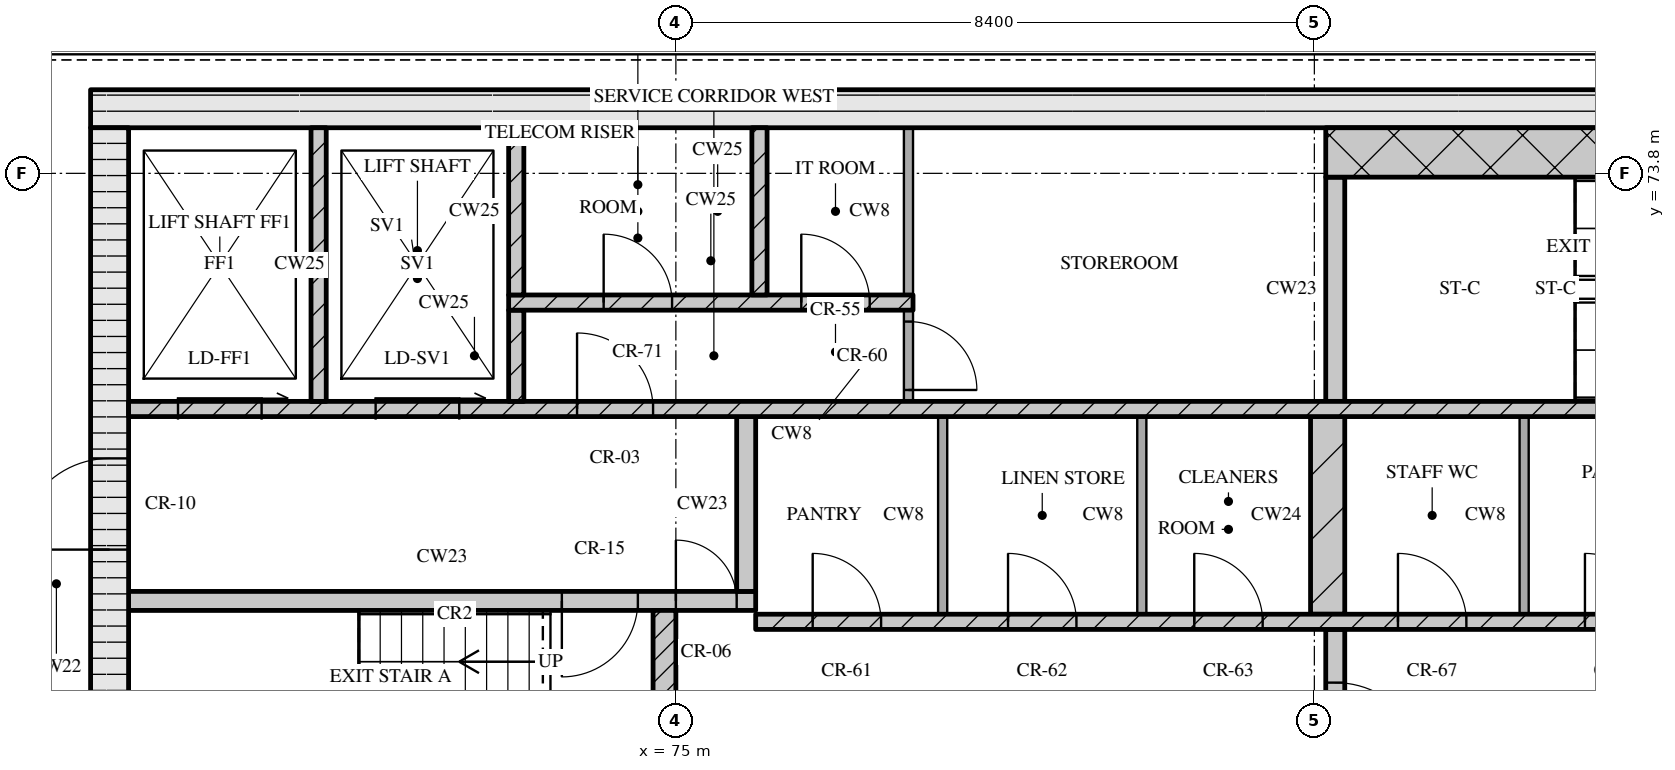
"""IFC4 building model, lengths in metres.
Left out: names, types, materials, properties, quantities, classifications, styles, units other than length and angle.
Written with IfcOpenShell. Run it as: python <this file> out.ifc"""

import sys

from ifc_helpers import new_model, si_unit, direction, frame, frame_2d, origin, place, context, subcontext, project, spatial, rectangle, extrude, element, fill, save


model = new_model("IFC4")
c1 = context("Model", 3, precision=1e-05, world=origin(), true_north=direction((0.0, 1.0)))
c2 = subcontext(c1, "Body", "Model", "MODEL_VIEW")
j1 = project(units=[si_unit("LENGTHUNIT", "METRE"), si_unit("PLANEANGLEUNIT", "RADIAN")], contexts=[c1])
p1 = place(None, origin())
s1 = spatial("IfcSite", under=j1, at=p1, CompositionType="ELEMENT")
p2 = place(p1, origin())
s2 = spatial("IfcBuilding", under=s1, at=p2, CompositionType="ELEMENT")
p3 = place(p2, frame((0.0, 0.0, 285.15)))
s3 = spatial("IfcBuildingStorey", under=s2, at=p3, CompositionType="ELEMENT", Elevation=285.15)
p4 = place(p3, frame((67.3, 74.65, 0.0), z_axis=(0.0, 0.0, 1.0), x_axis=(1.0, 0.0, 0.0)))
e1 = element("IfcWall", 1, at=p4, inside=s3, PredefinedType="SOLIDWALL", context=c2, shape_type="SweptSolid", body=[
    extrude(rectangle(XDim=40.6, YDim=0.5, at=frame_2d((20.3, 0.0))), origin(), (0.0, 0.0, 1.0), 3.32),
])
p5 = place(p3, frame((67.55, 62.4, 0.0), z_axis=(0.0, 0.0, 1.0), x_axis=(0.0, 1.0, 0.0)))
e2 = element("IfcWall", 2, at=p5, inside=s3, PredefinedType="SOLIDWALL", context=c2, shape_type="SweptSolid", body=[
    extrude(rectangle(XDim=12.0, YDim=0.5, at=frame_2d((6.0, 0.0))), origin(), (0.0, 0.0, 1.0), 3.32),
])
p6 = place(p5, frame((6.45, 0.0, 0.0)))
e3 = element("IfcOpeningElement", 3, at=p6, cuts=e2, PredefinedType="OPENING", context=c2, shape_type="SweptSolid", body=[
    extrude(rectangle(XDim=1.2, YDim=2.1, at=frame_2d((0.6, 1.05))), frame((0.0, 0.26, 0.0), z_axis=(0.0, -1.0, 0.0), x_axis=(1.0, 0.0, 0.0)), (0.0, 0.0, 1.0), 0.52),
])
p7 = place(p3, frame((74.85, 65.2, 0.0), z_axis=(0.0, 0.0, 1.0), x_axis=(0.0, 1.0, 0.0)))
e4 = element("IfcWall", 4, at=p7, inside=s3, PredefinedType="SOLIDWALL", context=c2, shape_type="SweptSolid", body=[
    extrude(rectangle(XDim=2.85, YDim=0.3, at=frame_2d((1.425, 0.0))), origin(), (0.0, 0.0, 1.0), 3.32),
])
p8 = place(p3, frame((83.675, 65.2, 0.0), z_axis=(0.0, 0.0, 1.0), x_axis=(0.0, 1.0, 0.0)))
e5 = element("IfcWall", 5, at=p8, inside=s3, PredefinedType="SOLIDWALL", context=c2, shape_type="SweptSolid", body=[
    extrude(rectangle(XDim=2.6, YDim=0.25, at=frame_2d((1.3, 0.0))), origin(), (0.0, 0.0, 1.0), 3.32),
])
p9 = place(p8, frame((0.7, 0.0, 0.0)))
e6 = element("IfcOpeningElement", 6, at=p9, cuts=e5, PredefinedType="OPENING", context=c2, shape_type="SweptSolid", body=[
    extrude(rectangle(XDim=1.2, YDim=2.1, at=frame_2d((0.6, 1.05))), frame((0.0, 0.135, 0.0), z_axis=(0.0, -1.0, 0.0), x_axis=(1.0, 0.0, 0.0)), (0.0, 0.0, 1.0), 0.27),
])
p10 = place(p3, frame((76.05, 67.9, 0.0), z_axis=(0.0, 0.0, 1.0), x_axis=(1.0, 0.0, 0.0)))
e7 = element("IfcWall", 7, at=p10, inside=s3, PredefinedType="SOLIDWALL", context=c2, shape_type="SweptSolid", body=[
    extrude(rectangle(XDim=23.1, YDim=0.2, at=frame_2d((11.55, 0.0))), origin(), (0.0, 0.0, 1.0), 3.32),
])
p11 = place(p10, frame((0.75, 0.0, 0.0)))
e8 = element("IfcOpeningElement", 8, at=p11, cuts=e7, PredefinedType="OPENING", context=c2, shape_type="SweptSolid", body=[
    extrude(rectangle(XDim=0.9, YDim=2.1, at=frame_2d((0.45, 1.05))), frame((0.0, 0.11, 0.0), z_axis=(0.0, -1.0, 0.0), x_axis=(1.0, 0.0, 0.0)), (0.0, 0.0, 1.0), 0.22),
])
p12 = place(p10, frame((3.32, 0.0, 0.0)))
e9 = element("IfcOpeningElement", 9, at=p12, cuts=e7, PredefinedType="OPENING", context=c2, shape_type="SweptSolid", body=[
    extrude(rectangle(XDim=0.9, YDim=2.1, at=frame_2d((0.45, 1.05))), frame((0.0, 0.11, 0.0), z_axis=(0.0, -1.0, 0.0), x_axis=(1.0, 0.0, 0.0)), (0.0, 0.0, 1.0), 0.22),
])
p13 = place(p10, frame((5.77, 0.0, 0.0)))
e10 = element("IfcOpeningElement", 10, at=p13, cuts=e7, PredefinedType="OPENING", context=c2, shape_type="SweptSolid", body=[
    extrude(rectangle(XDim=0.9, YDim=2.1, at=frame_2d((0.45, 1.05))), frame((0.0, 0.11, 0.0), z_axis=(0.0, -1.0, 0.0), x_axis=(1.0, 0.0, 0.0)), (0.0, 0.0, 1.0), 0.22),
])
p14 = place(p10, frame((8.45, 0.0, 0.0)))
e11 = element("IfcOpeningElement", 11, at=p14, cuts=e7, PredefinedType="OPENING", context=c2, shape_type="SweptSolid", body=[
    extrude(rectangle(XDim=0.9, YDim=2.1, at=frame_2d((0.45, 1.05))), frame((0.0, 0.11, 0.0), z_axis=(0.0, -1.0, 0.0), x_axis=(1.0, 0.0, 0.0)), (0.0, 0.0, 1.0), 0.22),
])
p15 = place(p10, frame((10.91, 0.0, 0.0)))
e12 = element("IfcOpeningElement", 12, at=p15, cuts=e7, PredefinedType="OPENING", context=c2, shape_type="SweptSolid", body=[
    extrude(rectangle(XDim=0.9, YDim=2.1, at=frame_2d((0.45, 1.05))), frame((0.0, 0.11, 0.0), z_axis=(0.0, -1.0, 0.0), x_axis=(1.0, 0.0, 0.0)), (0.0, 0.0, 1.0), 0.22),
])
p16 = place(p10, frame((13.55, 0.0, 0.0)))
e13 = element("IfcOpeningElement", 13, at=p16, cuts=e7, PredefinedType="OPENING", context=c2, shape_type="SweptSolid", body=[
    extrude(rectangle(XDim=1.0, YDim=2.1, at=frame_2d((0.5, 1.05))), frame((0.0, 0.11, 0.0), z_axis=(0.0, -1.0, 0.0), x_axis=(1.0, 0.0, 0.0)), (0.0, 0.0, 1.0), 0.22),
])
p17 = place(p10, frame((16.2, 0.0, 0.0)))
e14 = element("IfcOpeningElement", 14, at=p17, cuts=e7, PredefinedType="OPENING", context=c2, shape_type="SweptSolid", body=[
    extrude(rectangle(XDim=1.1, YDim=2.1, at=frame_2d((0.55, 1.05))), frame((0.0, 0.11, 0.0), z_axis=(0.0, -1.0, 0.0), x_axis=(1.0, 0.0, 0.0)), (0.0, 0.0, 1.0), 0.22),
])
p18 = place(p10, frame((18.7, 0.0, 0.0)))
e15 = element("IfcOpeningElement", 15, at=p18, cuts=e7, PredefinedType="OPENING", context=c2, shape_type="SweptSolid", body=[
    extrude(rectangle(XDim=1.1, YDim=2.1, at=frame_2d((0.55, 1.05))), frame((0.0, 0.11, 0.0), z_axis=(0.0, -1.0, 0.0), x_axis=(1.0, 0.0, 0.0)), (0.0, 0.0, 1.0), 0.22),
])
p19 = place(p10, frame((21.2, 0.0, 0.0)))
e16 = element("IfcOpeningElement", 16, at=p19, cuts=e7, PredefinedType="OPENING", context=c2, shape_type="SweptSolid", body=[
    extrude(rectangle(XDim=1.1, YDim=2.1, at=frame_2d((0.55, 1.05))), frame((0.0, 0.11, 0.0), z_axis=(0.0, -1.0, 0.0), x_axis=(1.0, 0.0, 0.0)), (0.0, 0.0, 1.0), 0.22),
])
for number, where, z_axis, x_axis in (
    (17, (78.51, 68.0, 0.0), (0.0, 0.0, 1.0), (0.0, 1.0, 0.0)),
    (18, (81.13, 68.0, 0.0), (0.0, 0.0, 1.0), (0.0, 1.0, 0.0)),
):
    element("IfcWall", number, at=place(p3, frame(where, z_axis=z_axis, x_axis=x_axis)), inside=s3, PredefinedType="PARTITIONING", context=c2, shape_type="SweptSolid", body=[
        extrude(rectangle(XDim=2.6, YDim=0.12, at=frame_2d((1.3, 0.0))), origin(), (0.0, 0.0, 1.0), 3.32),
    ])
p20 = place(p3, frame((83.575, 68.0, 0.0), z_axis=(0.0, 0.0, 1.0), x_axis=(0.0, 1.0, 0.0)))
e19 = element("IfcWall", 19, at=p20, inside=s3, PredefinedType="SOLIDWALL", context=c2, shape_type="SweptSolid", body=[
    extrude(rectangle(XDim=2.6, YDim=0.45, at=frame_2d((1.3, 0.0))), origin(), (0.0, 0.0, 1.0), 3.32),
])
p21 = place(p3, frame((86.16, 68.0, 0.0), z_axis=(0.0, 0.0, 1.0), x_axis=(0.0, 1.0, 0.0)))
e20 = element("IfcWall", 20, at=p21, inside=s3, PredefinedType="PARTITIONING", context=c2, shape_type="SweptSolid", body=[
    extrude(rectangle(XDim=2.6, YDim=0.12, at=frame_2d((1.3, 0.0))), origin(), (0.0, 0.0, 1.0), 3.32),
])
p22 = place(p3, frame((67.8, 68.175, 0.0), z_axis=(0.0, 0.0, 1.0), x_axis=(1.0, 0.0, 0.0)))
e21 = element("IfcWall", 21, at=p22, inside=s3, PredefinedType="SOLIDWALL", context=c2, shape_type="SweptSolid", body=[
    extrude(rectangle(XDim=8.25, YDim=0.25, at=frame_2d((4.125, 0.0))), origin(), (0.0, 0.0, 1.0), 3.32),
])
p23 = place(p22, frame((5.7, 0.0, 0.0)))
e22 = element("IfcOpeningElement", 22, at=p23, cuts=e21, PredefinedType="OPENING", context=c2, shape_type="SweptSolid", body=[
    extrude(rectangle(XDim=1.0, YDim=2.1, at=frame_2d((0.5, 1.05))), frame((0.0, 0.135, 0.0), z_axis=(0.0, -1.0, 0.0), x_axis=(1.0, 0.0, 0.0)), (0.0, 0.0, 1.0), 0.27),
])
p24 = place(p22, frame((7.2, 0.0, 0.0)))
e23 = element("IfcOpeningElement", 23, at=p24, cuts=e21, PredefinedType="OPENING", context=c2, shape_type="SweptSolid", body=[
    extrude(rectangle(XDim=0.8, YDim=2.1, at=frame_2d((0.4, 1.05))), frame((0.0, 0.135, 0.0), z_axis=(0.0, -1.0, 0.0), x_axis=(1.0, 0.0, 0.0)), (0.0, 0.0, 1.0), 0.27),
])
p25 = place(p3, frame((75.925, 68.3, 0.0), z_axis=(0.0, 0.0, 1.0), x_axis=(0.0, 1.0, 0.0)))
e24 = element("IfcWall", 24, at=p25, inside=s3, PredefinedType="SOLIDWALL", context=c2, shape_type="SweptSolid", body=[
    extrude(rectangle(XDim=2.3, YDim=0.25, at=frame_2d((1.15, 0.0))), origin(), (0.0, 0.0, 1.0), 3.32),
])
p26 = place(p3, frame((67.8, 70.7, 0.0), z_axis=(0.0, 0.0, 1.0), x_axis=(1.0, 0.0, 0.0)))
e25 = element("IfcWall", 25, at=p26, inside=s3, PredefinedType="SOLIDWALL", context=c2, shape_type="SweptSolid", body=[
    extrude(rectangle(XDim=39.6, YDim=0.2, at=frame_2d((19.8, 0.0))), origin(), (0.0, 0.0, 1.0), 3.32),
])
p27 = place(p26, frame((0.65, 0.0, 0.0)))
e26 = element("IfcOpeningElement", 26, at=p27, cuts=e25, PredefinedType="OPENING", context=c2, shape_type="SweptSolid", body=[
    extrude(rectangle(XDim=1.1, YDim=2.1, at=frame_2d((0.55, 1.05))), frame((0.0, 0.11, 0.0), z_axis=(0.0, -1.0, 0.0), x_axis=(1.0, 0.0, 0.0)), (0.0, 0.0, 1.0), 0.22),
])
p28 = place(p26, frame((3.25, 0.0, 0.0)))
e27 = element("IfcOpeningElement", 27, at=p28, cuts=e25, PredefinedType="OPENING", context=c2, shape_type="SweptSolid", body=[
    extrude(rectangle(XDim=1.1, YDim=2.1, at=frame_2d((0.55, 1.05))), frame((0.0, 0.11, 0.0), z_axis=(0.0, -1.0, 0.0), x_axis=(1.0, 0.0, 0.0)), (0.0, 0.0, 1.0), 0.22),
])
p29 = place(p26, frame((5.9, 0.0, 0.0)))
e28 = element("IfcOpeningElement", 28, at=p29, cuts=e25, PredefinedType="OPENING", context=c2, shape_type="SweptSolid", body=[
    extrude(rectangle(XDim=1.0, YDim=2.1, at=frame_2d((0.5, 1.05))), frame((0.0, 0.11, 0.0), z_axis=(0.0, -1.0, 0.0), x_axis=(1.0, 0.0, 0.0)), (0.0, 0.0, 1.0), 0.22),
])
p30 = place(p26, frame((21.7, 0.0, 0.0)))
e29 = element("IfcOpeningElement", 29, at=p30, cuts=e25, PredefinedType="OPENING", context=c2, shape_type="SweptSolid", body=[
    extrude(rectangle(XDim=1.0, YDim=2.1, at=frame_2d((0.5, 1.05))), frame((0.0, 0.11, 0.0), z_axis=(0.0, -1.0, 0.0), x_axis=(1.0, 0.0, 0.0)), (0.0, 0.0, 1.0), 0.22),
])
p31 = place(p26, frame((32.7, 0.0, 0.0)))
e30 = element("IfcOpeningElement", 30, at=p31, cuts=e25, PredefinedType="OPENING", context=c2, shape_type="SweptSolid", body=[
    extrude(rectangle(XDim=1.0, YDim=2.1, at=frame_2d((0.5, 1.05))), frame((0.0, 0.11, 0.0), z_axis=(0.0, -1.0, 0.0), x_axis=(1.0, 0.0, 0.0)), (0.0, 0.0, 1.0), 0.22),
])
p32 = place(p26, frame((35.25, 0.0, 0.0)))
e31 = element("IfcOpeningElement", 31, at=p32, cuts=e25, PredefinedType="OPENING", context=c2, shape_type="SweptSolid", body=[
    extrude(rectangle(XDim=1.1, YDim=2.1, at=frame_2d((0.55, 1.05))), frame((0.0, 0.11, 0.0), z_axis=(0.0, -1.0, 0.0), x_axis=(1.0, 0.0, 0.0)), (0.0, 0.0, 1.0), 0.22),
])
p33 = place(p26, frame((37.85, 0.0, 0.0)))
e32 = element("IfcOpeningElement", 32, at=p33, cuts=e25, PredefinedType="OPENING", context=c2, shape_type="SweptSolid", body=[
    extrude(rectangle(XDim=1.1, YDim=2.1, at=frame_2d((0.55, 1.05))), frame((0.0, 0.11, 0.0), z_axis=(0.0, -1.0, 0.0), x_axis=(1.0, 0.0, 0.0)), (0.0, 0.0, 1.0), 0.22),
])
p34 = place(p3, frame((70.3, 70.8, 0.0), z_axis=(0.0, 0.0, 1.0), x_axis=(0.0, 1.0, 0.0)))
e33 = element("IfcWall", 33, at=p34, inside=s3, PredefinedType="SOLIDWALL", context=c2, shape_type="SweptSolid", body=[
    extrude(rectangle(XDim=3.6, YDim=0.2, at=frame_2d((1.8, 0.0))), origin(), (0.0, 0.0, 1.0), 3.32),
])
p35 = place(p3, frame((72.9, 70.8, 0.0), z_axis=(0.0, 0.0, 1.0), x_axis=(0.0, 1.0, 0.0)))
e34 = element("IfcWall", 34, at=p35, inside=s3, PredefinedType="SOLIDWALL", context=c2, shape_type="SweptSolid", body=[
    extrude(rectangle(XDim=1.2, YDim=0.2, at=frame_2d((0.6, 0.0))), origin(), (0.0, 0.0, 1.0), 3.32),
])
p36 = place(p3, frame((78.06, 70.8, 0.0), z_axis=(0.0, 0.0, 1.0), x_axis=(0.0, 1.0, 0.0)))
e35 = element("IfcWall", 35, at=p36, inside=s3, PredefinedType="PARTITIONING", context=c2, shape_type="SweptSolid", body=[
    extrude(rectangle(XDim=1.2, YDim=0.12, at=frame_2d((0.6, 0.0))), origin(), (0.0, 0.0, 1.0), 3.32),
])
p37 = place(p36, frame((0.15, 0.0, 0.0)))
e36 = element("IfcOpeningElement", 36, at=p37, cuts=e35, PredefinedType="OPENING", context=c2, shape_type="SweptSolid", body=[
    extrude(rectangle(XDim=0.9, YDim=2.1, at=frame_2d((0.45, 1.05))), frame((0.0, 0.07, 0.0), z_axis=(0.0, -1.0, 0.0), x_axis=(1.0, 0.0, 0.0)), (0.0, 0.0, 1.0), 0.14),
])
p38 = place(p3, frame((83.675, 70.8, 0.0), z_axis=(0.0, 0.0, 1.0), x_axis=(0.0, 1.0, 0.0)))
e37 = element("IfcWall", 37, at=p38, inside=s3, PredefinedType="SOLIDWALL", context=c2, shape_type="SweptSolid", body=[
    extrude(rectangle(XDim=2.95, YDim=0.25, at=frame_2d((1.475, 0.0))), origin(), (0.0, 0.0, 1.0), 3.32),
])
p39 = place(p3, frame((72.8, 72.1, 0.0), z_axis=(0.0, 0.0, 1.0), x_axis=(1.0, 0.0, 0.0)))
e38 = element("IfcWall", 38, at=p39, inside=s3, PredefinedType="SOLIDWALL", context=c2, shape_type="SweptSolid", body=[
    extrude(rectangle(XDim=5.32, YDim=0.2, at=frame_2d((2.66, 0.0))), origin(), (0.0, 0.0, 1.0), 3.32),
])
p40 = place(p39, frame((1.25, 0.0, 0.0)))
e39 = element("IfcOpeningElement", 39, at=p40, cuts=e38, PredefinedType="OPENING", context=c2, shape_type="SweptSolid", body=[
    extrude(rectangle(XDim=0.9, YDim=2.1, at=frame_2d((0.45, 1.05))), frame((0.0, 0.11, 0.0), z_axis=(0.0, -1.0, 0.0), x_axis=(1.0, 0.0, 0.0)), (0.0, 0.0, 1.0), 0.22),
])
p41 = place(p39, frame((3.85, 0.0, 0.0)))
e40 = element("IfcOpeningElement", 40, at=p41, cuts=e38, PredefinedType="OPENING", context=c2, shape_type="SweptSolid", body=[
    extrude(rectangle(XDim=0.9, YDim=2.1, at=frame_2d((0.45, 1.05))), frame((0.0, 0.11, 0.0), z_axis=(0.0, -1.0, 0.0), x_axis=(1.0, 0.0, 0.0)), (0.0, 0.0, 1.0), 0.22),
])
for number, where, z_axis, x_axis in (
    (41, (72.9, 72.2, 0.0), (0.0, 0.0, 1.0), (0.0, 1.0, 0.0)),
    (42, (76.1, 72.2, 0.0), (0.0, 0.0, 1.0), (0.0, 1.0, 0.0)),
):
    element("IfcWall", number, at=place(p3, frame(where, z_axis=z_axis, x_axis=x_axis)), inside=s3, PredefinedType="SOLIDWALL", context=c2, shape_type="SweptSolid", body=[
        extrude(rectangle(XDim=2.2, YDim=0.2, at=frame_2d((1.1, 0.0))), origin(), (0.0, 0.0, 1.0), 3.32),
    ])
p42 = place(p3, frame((78.06, 72.2, 0.0), z_axis=(0.0, 0.0, 1.0), x_axis=(0.0, 1.0, 0.0)))
e43 = element("IfcWall", 43, at=p42, inside=s3, PredefinedType="PARTITIONING", context=c2, shape_type="SweptSolid", body=[
    extrude(rectangle(XDim=2.2, YDim=0.12, at=frame_2d((1.1, 0.0))), origin(), (0.0, 0.0, 1.0), 3.32),
])
p43 = place(p3, frame((83.55, 74.075, 0.0), z_axis=(0.0, 0.0, 1.0), x_axis=(1.0, 0.0, 0.0)))
e44 = element("IfcWall", 44, at=p43, inside=s3, PredefinedType="SOLIDWALL", context=c2, shape_type="SweptSolid", body=[
    extrude(rectangle(XDim=8.1, YDim=0.65, at=frame_2d((4.05, 0.0))), origin(), (0.0, 0.0, 1.0), 3.32),
])
p44 = place(p9, origin())
e45 = element("IfcDoor", 45, at=p44, inside=s3, OperationType="SINGLE_SWING_RIGHT", PredefinedType="DOOR", context=c2, shape_type="SweptSolid", body=[
    extrude(rectangle(XDim=1.2, YDim=2.1, at=frame_2d((0.6, 1.05))), frame((0.0, 0.025, 0.0), z_axis=(0.0, -1.0, 0.0), x_axis=(1.0, 0.0, 0.0)), (0.0, 0.0, 1.0), 0.05),
])
fill(e6, e45)
p45 = place(p11, origin())
e46 = element("IfcDoor", 46, at=p45, inside=s3, OperationType="SINGLE_SWING_LEFT", PredefinedType="DOOR", context=c2, shape_type="SweptSolid", body=[
    extrude(rectangle(XDim=0.9, YDim=2.1, at=frame_2d((0.45, 1.05))), frame((0.0, 0.025, 0.0), z_axis=(0.0, -1.0, 0.0), x_axis=(1.0, 0.0, 0.0)), (0.0, 0.0, 1.0), 0.05),
])
fill(e8, e46)
p46 = place(p12, origin())
e47 = element("IfcDoor", 47, at=p46, inside=s3, OperationType="SINGLE_SWING_LEFT", PredefinedType="DOOR", context=c2, shape_type="SweptSolid", body=[
    extrude(rectangle(XDim=0.9, YDim=2.1, at=frame_2d((0.45, 1.05))), frame((0.0, 0.025, 0.0), z_axis=(0.0, -1.0, 0.0), x_axis=(1.0, 0.0, 0.0)), (0.0, 0.0, 1.0), 0.05),
])
fill(e9, e47)
p47 = place(p13, origin())
e48 = element("IfcDoor", 48, at=p47, inside=s3, OperationType="SINGLE_SWING_LEFT", PredefinedType="DOOR", context=c2, shape_type="SweptSolid", body=[
    extrude(rectangle(XDim=0.9, YDim=2.1, at=frame_2d((0.45, 1.05))), frame((0.0, 0.025, 0.0), z_axis=(0.0, -1.0, 0.0), x_axis=(1.0, 0.0, 0.0)), (0.0, 0.0, 1.0), 0.05),
])
fill(e10, e48)
p48 = place(p14, origin())
e49 = element("IfcDoor", 49, at=p48, inside=s3, OperationType="SINGLE_SWING_LEFT", PredefinedType="DOOR", context=c2, shape_type="SweptSolid", body=[
    extrude(rectangle(XDim=0.9, YDim=2.1, at=frame_2d((0.45, 1.05))), frame((0.0, 0.025, 0.0), z_axis=(0.0, -1.0, 0.0), x_axis=(1.0, 0.0, 0.0)), (0.0, 0.0, 1.0), 0.05),
])
fill(e11, e49)
p49 = place(p15, origin())
e50 = element("IfcDoor", 50, at=p49, inside=s3, OperationType="SINGLE_SWING_LEFT", PredefinedType="DOOR", context=c2, shape_type="SweptSolid", body=[
    extrude(rectangle(XDim=0.9, YDim=2.1, at=frame_2d((0.45, 1.05))), frame((0.0, 0.025, 0.0), z_axis=(0.0, -1.0, 0.0), x_axis=(1.0, 0.0, 0.0)), (0.0, 0.0, 1.0), 0.05),
])
fill(e12, e50)
p50 = place(p23, origin())
e51 = element("IfcDoor", 51, at=p50, inside=s3, OperationType="SINGLE_SWING_RIGHT", PredefinedType="DOOR", context=c2, shape_type="SweptSolid", body=[
    extrude(rectangle(XDim=1.0, YDim=2.1, at=frame_2d((0.5, 1.05))), frame((0.0, 0.025, 0.0), z_axis=(0.0, -1.0, 0.0), x_axis=(1.0, 0.0, 0.0)), (0.0, 0.0, 1.0), 0.05),
])
fill(e22, e51)
p51 = place(p24, origin())
e52 = element("IfcDoor", 52, at=p51, inside=s3, OperationType="SINGLE_SWING_LEFT", PredefinedType="DOOR", context=c2, shape_type="SweptSolid", body=[
    extrude(rectangle(XDim=0.8, YDim=2.1, at=frame_2d((0.4, 1.05))), frame((0.0, 0.025, 0.0), z_axis=(0.0, -1.0, 0.0), x_axis=(1.0, 0.0, 0.0)), (0.0, 0.0, 1.0), 0.05),
])
fill(e23, e52)
p52 = place(p6, origin())
e53 = element("IfcDoor", 53, at=p52, inside=s3, OperationType="SINGLE_SWING_LEFT", PredefinedType="DOOR", context=c2, shape_type="SweptSolid", body=[
    extrude(rectangle(XDim=1.2, YDim=2.1, at=frame_2d((0.6, 1.05))), frame((0.0, 0.025, 0.0), z_axis=(0.0, -1.0, 0.0), x_axis=(1.0, 0.0, 0.0)), (0.0, 0.0, 1.0), 0.05),
])
fill(e3, e53)
p53 = place(p27, origin())
e54 = element("IfcDoor", 54, at=p53, inside=s3, OperationType="SLIDING_TO_RIGHT", PredefinedType="DOOR", context=c2, shape_type="SweptSolid", body=[
    extrude(rectangle(XDim=1.1, YDim=2.1, at=frame_2d((0.55, 1.05))), frame((0.0, 0.025, 0.0), z_axis=(0.0, -1.0, 0.0), x_axis=(1.0, 0.0, 0.0)), (0.0, 0.0, 1.0), 0.05),
])
fill(e26, e54)
p54 = place(p28, origin())
e55 = element("IfcDoor", 55, at=p54, inside=s3, OperationType="SLIDING_TO_RIGHT", PredefinedType="DOOR", context=c2, shape_type="SweptSolid", body=[
    extrude(rectangle(XDim=1.1, YDim=2.1, at=frame_2d((0.55, 1.05))), frame((0.0, 0.025, 0.0), z_axis=(0.0, -1.0, 0.0), x_axis=(1.0, 0.0, 0.0)), (0.0, 0.0, 1.0), 0.05),
])
fill(e27, e55)
p55 = place(p29, origin())
e56 = element("IfcDoor", 56, at=p55, inside=s3, OperationType="SINGLE_SWING_LEFT", PredefinedType="DOOR", context=c2, shape_type="SweptSolid", body=[
    extrude(rectangle(XDim=1.0, YDim=2.1, at=frame_2d((0.5, 1.05))), frame((0.0, 0.025, 0.0), z_axis=(0.0, -1.0, 0.0), x_axis=(1.0, 0.0, 0.0)), (0.0, 0.0, 1.0), 0.05),
])
fill(e28, e56)
p56 = place(p37, origin())
e57 = element("IfcDoor", 57, at=p56, inside=s3, OperationType="SINGLE_SWING_RIGHT", PredefinedType="DOOR", context=c2, shape_type="SweptSolid", body=[
    extrude(rectangle(XDim=0.9, YDim=2.1, at=frame_2d((0.45, 1.05))), frame((0.0, 0.025, 0.0), z_axis=(0.0, -1.0, 0.0), x_axis=(1.0, 0.0, 0.0)), (0.0, 0.0, 1.0), 0.05),
])
fill(e36, e57)
p57 = place(p40, origin())
e58 = element("IfcDoor", 58, at=p57, inside=s3, OperationType="SINGLE_SWING_LEFT", PredefinedType="DOOR", context=c2, shape_type="SweptSolid", body=[
    extrude(rectangle(XDim=0.9, YDim=2.1, at=frame_2d((0.45, 1.05))), frame((0.0, 0.025, 0.0), z_axis=(0.0, -1.0, 0.0), x_axis=(1.0, 0.0, 0.0)), (0.0, 0.0, 1.0), 0.05),
])
fill(e39, e58)
p58 = place(p41, origin())
e59 = element("IfcDoor", 59, at=p58, inside=s3, OperationType="SINGLE_SWING_LEFT", PredefinedType="DOOR", context=c2, shape_type="SweptSolid", body=[
    extrude(rectangle(XDim=0.9, YDim=2.1, at=frame_2d((0.45, 1.05))), frame((0.0, 0.025, 0.0), z_axis=(0.0, -1.0, 0.0), x_axis=(1.0, 0.0, 0.0)), (0.0, 0.0, 1.0), 0.05),
])
fill(e40, e59)
save(model, sys.argv[1])
